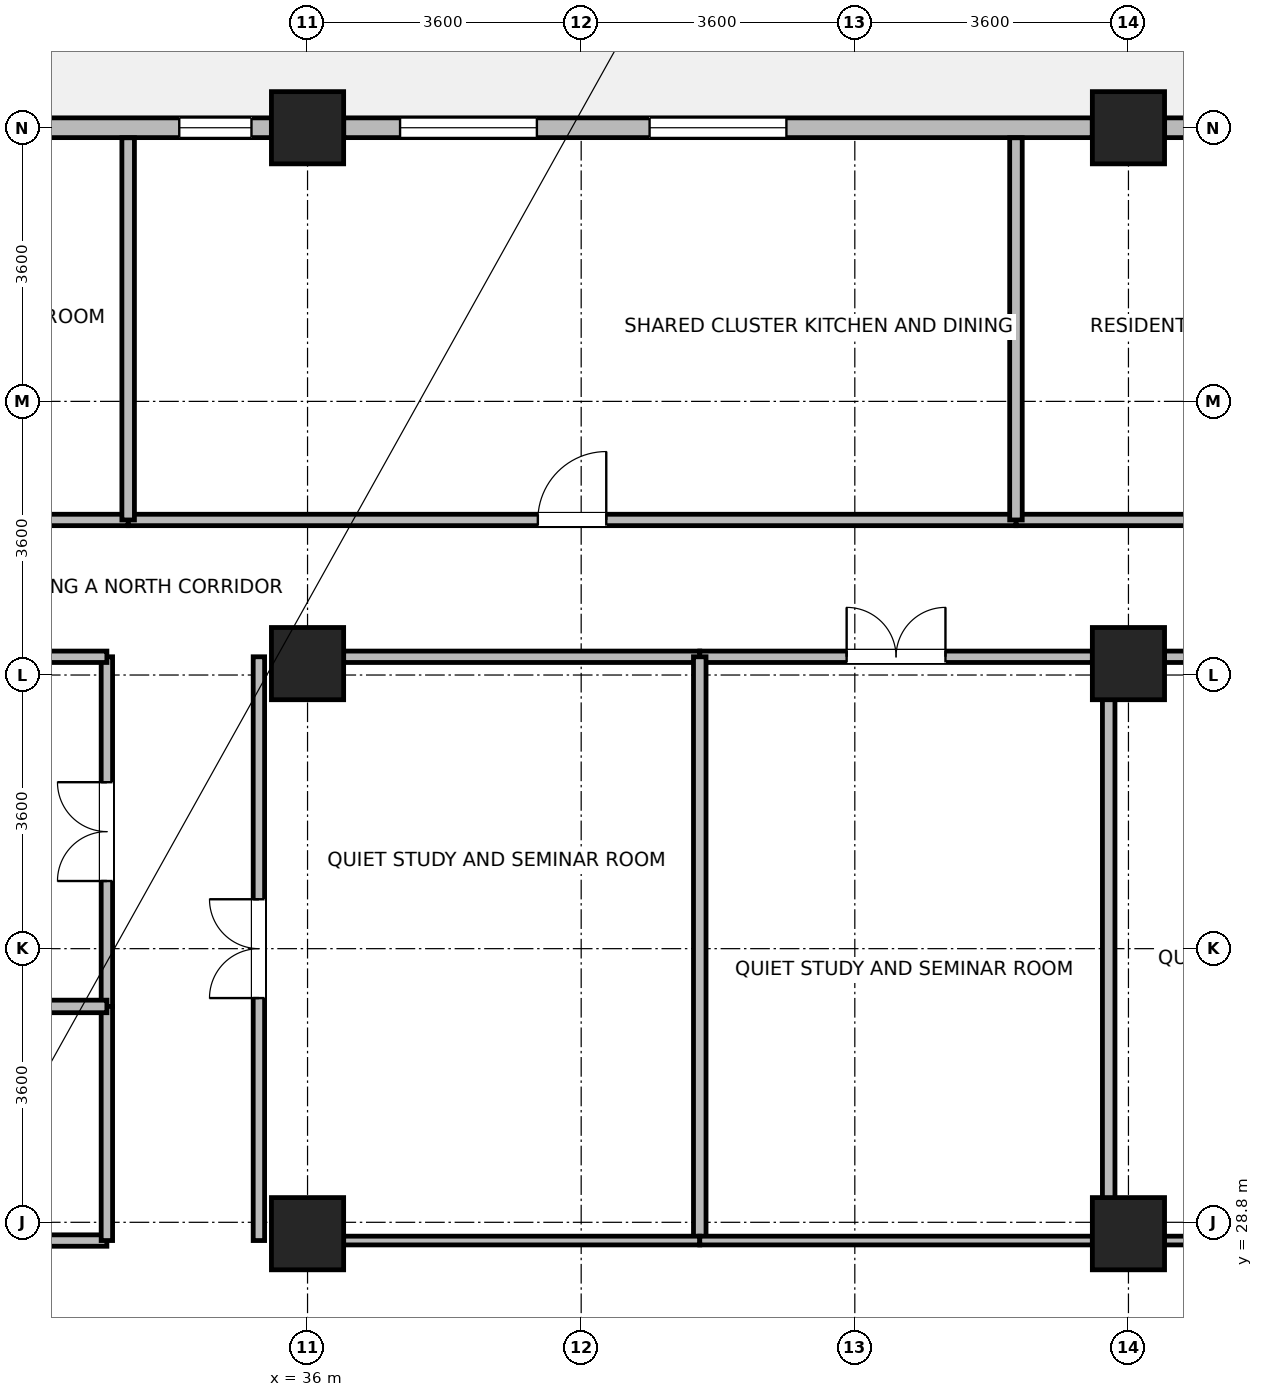
"""IFC4 building model, lengths in metres.
Left out: names, types, materials, properties, quantities, classifications, styles, units other than length and angle.
Written with IfcOpenShell. Run it as: python <this file> out.ifc"""

import sys

from ifc_helpers import new_model, si_unit, direction, frame, frame_2d, origin, origin_2d, place, context, subcontext, project, spatial, rectangle, extrude, source, transform, mapped, element, fill, save


model = new_model("IFC4")
c1 = context("Model", 3, precision=1e-05, world=origin(), true_north=direction((0.0, 1.0)))
c2 = subcontext(c1, "Body", "Model", "MODEL_VIEW")
j1 = project(units=[si_unit("LENGTHUNIT", "METRE"), si_unit("PLANEANGLEUNIT", "RADIAN")], contexts=[c1])
p1 = place(None, origin())
s1 = spatial("IfcSite", under=j1, at=p1, CompositionType="ELEMENT")
p2 = place(p1, origin())
s2 = spatial("IfcBuilding", under=s1, at=p2, CompositionType="ELEMENT")
p3 = place(p2, frame((0.0, 0.0, 212.9)))
s3 = spatial("IfcBuildingStorey", under=s2, at=p3, CompositionType="ELEMENT", Elevation=212.9)
m1 = source(origin(), c2, "Body", "SweptSolid", [
    extrude(rectangle(XDim=0.95, YDim=0.95, at=origin_2d()), origin(), (0.0, 0.0, 1.0), 3.7),
])
for number, where, z_axis, x_axis in (
    (1, (36.0, 43.2, 0.0), (0.0, 0.0, 1.0), (1.0, 0.0, 0.0)),
    (2, (36.0, 28.65, 0.0), (0.0, 0.0, 1.0), (1.0, 0.0, 0.0)),
    (3, (36.0, 36.15, 0.0), (0.0, 0.0, 1.0), (1.0, 0.0, 0.0)),
    (4, (46.8, 28.65, 0.0), (0.0, 0.0, 1.0), (1.0, 0.0, 0.0)),
    (5, (46.8, 36.15, 0.0), (0.0, 0.0, 1.0), (1.0, 0.0, 0.0)),
    (6, (46.8, 43.2, 0.0), (0.0, 0.0, 1.0), (1.0, 0.0, 0.0)),
):
    element("IfcColumn", number, at=place(p3, frame(where, z_axis=z_axis, x_axis=x_axis)), inside=s3, PredefinedType="COLUMN", context=c2, shape_type="MappedRepresentation", body=[
        mapped(m1, transform((0.0, 0.0, 0.0), x_axis=(1.0, 0.0, 0.0), y_axis=(0.0, 1.0, 0.0), z_axis=(0.0, 0.0, 1.0), scale=1.0)),
    ])
p4 = place(p3, frame((47.276, 43.2, 0.0), z_axis=(0.0, 0.0, 1.0), x_axis=(1.0, 0.0, 0.0)))
e7 = element("IfcWall", 7, at=p4, inside=s3, PredefinedType="STANDARD", context=c2, shape_type="SweptSolid", body=[
    extrude(rectangle(XDim=13.289, YDim=0.26, at=frame_2d((6.645, 0.0))), origin(), (0.0, 0.0, 1.0), 3.45),
])
p5 = place(p4, frame((5.894, 0.0, 0.0)))
e8 = element("IfcOpeningElement", 8, at=p5, cuts=e7, PredefinedType="OPENING", context=c2, shape_type="SweptSolid", body=[
    extrude(rectangle(XDim=1.5, YDim=2.15, at=frame_2d((0.75, 1.075))), frame((0.0, 0.14, 0.0), z_axis=(0.0, -1.0, 0.0), x_axis=(1.0, 0.0, 0.0)), (0.0, 0.0, 1.0), 0.28),
])
p6 = place(p4, frame((0.761, 0.0, 0.85)))
e9 = element("IfcOpeningElement", 9, at=p6, cuts=e7, PredefinedType="OPENING", context=c2, shape_type="SweptSolid", body=[
    extrude(rectangle(XDim=1.8, YDim=1.85, at=frame_2d((0.9, 0.925))), frame((0.0, 0.14, 0.0), z_axis=(0.0, -1.0, 0.0), x_axis=(1.0, 0.0, 0.0)), (0.0, 0.0, 1.0), 0.28),
])
p7 = place(p3, frame((36.476, 43.2, 0.0), z_axis=(0.0, 0.0, 1.0), x_axis=(1.0, 0.0, 0.0)))
e10 = element("IfcWall", 10, at=p7, inside=s3, PredefinedType="STANDARD", context=c2, shape_type="SweptSolid", body=[
    extrude(rectangle(XDim=9.848, YDim=0.26, at=frame_2d((4.924, 0.0))), origin(), (0.0, 0.0, 1.0), 3.05),
])
p8 = place(p7, frame((0.741, 0.0, 0.85)))
e11 = element("IfcOpeningElement", 11, at=p8, cuts=e10, PredefinedType="OPENING", context=c2, shape_type="SweptSolid", body=[
    extrude(rectangle(XDim=1.8, YDim=1.85, at=frame_2d((0.9, 0.925))), frame((0.0, 0.14, 0.0), z_axis=(0.0, -1.0, 0.0), x_axis=(1.0, 0.0, 0.0)), (0.0, 0.0, 1.0), 0.28),
])
p9 = place(p7, frame((4.024, 0.0, 0.85)))
e12 = element("IfcOpeningElement", 12, at=p9, cuts=e10, PredefinedType="OPENING", context=c2, shape_type="SweptSolid", body=[
    extrude(rectangle(XDim=1.8, YDim=1.85, at=frame_2d((0.9, 0.925))), frame((0.0, 0.14, 0.0), z_axis=(0.0, -1.0, 0.0), x_axis=(1.0, 0.0, 0.0)), (0.0, 0.0, 1.0), 0.28),
])
p10 = place(p3, frame((32.601, 43.2, 0.0), z_axis=(0.0, 0.0, 1.0), x_axis=(1.0, 0.0, 0.0)))
e13 = element("IfcWall", 13, at=p10, inside=s3, PredefinedType="STANDARD", context=c2, shape_type="SweptSolid", body=[
    extrude(rectangle(XDim=2.923, YDim=0.26, at=frame_2d((1.462, 0.0))), origin(), (0.0, 0.0, 1.0), 3.05),
])
p11 = place(p10, frame((1.712, 0.0, 0.85)))
e14 = element("IfcOpeningElement", 14, at=p11, cuts=e13, PredefinedType="OPENING", context=c2, shape_type="SweptSolid", body=[
    extrude(rectangle(XDim=0.95, YDim=1.75, at=frame_2d((0.475, 0.875))), frame((0.0, 0.14, 0.0), z_axis=(0.0, -1.0, 0.0), x_axis=(1.0, 0.0, 0.0)), (0.0, 0.0, 1.0), 0.28),
])
p12 = place(p3, frame((45.32, 38.04, 0.0), z_axis=(0.0, 0.0, 1.0), x_axis=(1.0, 0.0, 0.0)))
e15 = element("IfcWall", 15, at=p12, inside=s3, PredefinedType="PARTITIONING", context=c2, shape_type="SweptSolid", body=[
    extrude(rectangle(XDim=13.52, YDim=0.15, at=frame_2d((6.76, 0.0))), origin(), (0.0, 0.0, 1.0), 3.45),
])
p13 = place(p12, frame((6.11, 0.0, 0.0)))
e16 = element("IfcOpeningElement", 16, at=p13, cuts=e15, PredefinedType="OPENING", context=c2, shape_type="SweptSolid", body=[
    extrude(rectangle(XDim=1.3, YDim=2.12, at=frame_2d((0.65, 1.06))), frame((0.0, 0.085, 0.0), z_axis=(0.0, -1.0, 0.0), x_axis=(1.0, 0.0, 0.0)), (0.0, 0.0, 1.0), 0.17),
])
p14 = place(p3, frame((33.64, 38.04, 0.0), z_axis=(0.0, 0.0, 1.0), x_axis=(1.0, 0.0, 0.0)))
e17 = element("IfcWall", 17, at=p14, inside=s3, PredefinedType="PARTITIONING", context=c2, shape_type="SweptSolid", body=[
    extrude(rectangle(XDim=11.68, YDim=0.15, at=frame_2d((5.84, 0.0))), origin(), (0.0, 0.0, 1.0), 3.45),
])
p15 = place(p14, frame((5.39, 0.0, 0.0)))
e18 = element("IfcOpeningElement", 18, at=p15, cuts=e17, PredefinedType="OPENING", context=c2, shape_type="SweptSolid", body=[
    extrude(rectangle(XDim=0.9, YDim=2.08, at=frame_2d((0.45, 1.04))), frame((0.0, 0.085, 0.0), z_axis=(0.0, -1.0, 0.0), x_axis=(1.0, 0.0, 0.0)), (0.0, 0.0, 1.0), 0.17),
])
p16 = place(p3, frame((24.62, 38.04, 0.0), z_axis=(0.0, 0.0, 1.0), x_axis=(1.0, 0.0, 0.0)))
e19 = element("IfcWall", 19, at=p16, inside=s3, PredefinedType="PARTITIONING", context=c2, shape_type="SweptSolid", body=[
    extrude(rectangle(XDim=9.02, YDim=0.15, at=frame_2d((4.51, 0.0))), origin(), (0.0, 0.0, 1.0), 3.45),
])
p17 = place(p16, frame((3.86, 0.0, 0.0)))
e20 = element("IfcOpeningElement", 20, at=p17, cuts=e19, PredefinedType="OPENING", context=c2, shape_type="SweptSolid", body=[
    extrude(rectangle(XDim=1.3, YDim=2.12, at=frame_2d((0.65, 1.06))), frame((0.0, 0.085, 0.0), z_axis=(0.0, -1.0, 0.0), x_axis=(1.0, 0.0, 0.0)), (0.0, 0.0, 1.0), 0.17),
])
p18 = place(p3, frame((35.36, 28.56, 0.0), z_axis=(0.0, 0.0, 1.0), x_axis=(0.0, 1.0, 0.0)))
e21 = element("IfcWall", 21, at=p18, inside=s3, PredefinedType="PARTITIONING", context=c2, shape_type="SweptSolid", body=[
    extrude(rectangle(XDim=7.68, YDim=0.15, at=frame_2d((3.84, 0.0))), origin(), (0.0, 0.0, 1.0), 3.45),
])
p19 = place(p18, frame((3.19, 0.0, 0.0)))
e22 = element("IfcOpeningElement", 22, at=p19, cuts=e21, PredefinedType="OPENING", context=c2, shape_type="SweptSolid", body=[
    extrude(rectangle(XDim=1.3, YDim=2.12, at=frame_2d((0.65, 1.06))), frame((0.0, 0.085, 0.0), z_axis=(0.0, -1.0, 0.0), x_axis=(1.0, 0.0, 0.0)), (0.0, 0.0, 1.0), 0.17),
])
p20 = place(p3, frame((36.475, 36.24, 0.0), z_axis=(0.0, 0.0, 1.0), x_axis=(1.0, 0.0, 0.0)))
e23 = element("IfcWall", 23, at=p20, inside=s3, PredefinedType="PARTITIONING", context=c2, shape_type="SweptSolid", body=[
    extrude(rectangle(XDim=4.685, YDim=0.15, at=frame_2d((2.342, 0.0))), origin(), (0.0, 0.0, 1.0), 2.9),
])
p21 = place(p3, frame((41.16, 36.24, 0.0), z_axis=(0.0, 0.0, 1.0), x_axis=(1.0, 0.0, 0.0)))
e24 = element("IfcWall", 24, at=p21, inside=s3, PredefinedType="PARTITIONING", context=c2, shape_type="SweptSolid", body=[
    extrude(rectangle(XDim=5.165, YDim=0.15, at=frame_2d((2.583, 0.0))), origin(), (0.0, 0.0, 1.0), 2.9),
])
p22 = place(p21, frame((1.933, 0.0, 0.0)))
e25 = element("IfcOpeningElement", 25, at=p22, cuts=e24, PredefinedType="OPENING", context=c2, shape_type="SweptSolid", body=[
    extrude(rectangle(XDim=1.3, YDim=2.12, at=frame_2d((0.65, 1.06))), frame((0.0, 0.085, 0.0), z_axis=(0.0, -1.0, 0.0), x_axis=(1.0, 0.0, 0.0)), (0.0, 0.0, 1.0), 0.17),
])
p23 = place(p3, frame((47.275, 36.24, 0.0), z_axis=(0.0, 0.0, 1.0), x_axis=(1.0, 0.0, 0.0)))
e26 = element("IfcWall", 26, at=p23, inside=s3, PredefinedType="PARTITIONING", context=c2, shape_type="SweptSolid", body=[
    extrude(rectangle(XDim=2.65, YDim=0.15, at=frame_2d((1.325, 0.0))), origin(), (0.0, 0.0, 1.0), 2.9),
])
p24 = place(p23, frame((0.675, 0.0, 0.0)))
e27 = element("IfcOpeningElement", 27, at=p24, cuts=e26, PredefinedType="OPENING", context=c2, shape_type="SweptSolid", body=[
    extrude(rectangle(XDim=1.3, YDim=2.12, at=frame_2d((0.65, 1.06))), frame((0.0, 0.085, 0.0), z_axis=(0.0, -1.0, 0.0), x_axis=(1.0, 0.0, 0.0)), (0.0, 0.0, 1.0), 0.17),
])
p25 = place(p3, frame((33.36, 31.64, 0.0), z_axis=(0.0, 0.0, 1.0), x_axis=(0.0, 1.0, 0.0)))
e28 = element("IfcWall", 28, at=p25, inside=s3, PredefinedType="PARTITIONING", context=c2, shape_type="SweptSolid", body=[
    extrude(rectangle(XDim=4.6, YDim=0.15, at=frame_2d((2.3, 0.0))), origin(), (0.0, 0.0, 1.0), 3.45),
])
p26 = place(p25, frame((1.65, 0.0, 0.0)))
e29 = element("IfcOpeningElement", 29, at=p26, cuts=e28, PredefinedType="OPENING", context=c2, shape_type="SweptSolid", body=[
    extrude(rectangle(XDim=1.3, YDim=2.12, at=frame_2d((0.65, 1.06))), frame((0.0, 0.085, 0.0), z_axis=(0.0, -1.0, 0.0), x_axis=(1.0, 0.0, 0.0)), (0.0, 0.0, 1.0), 0.17),
])
p27 = place(p3, frame((29.275, 28.56, 0.0), z_axis=(0.0, 0.0, 1.0), x_axis=(1.0, 0.0, 0.0)))
e30 = element("IfcWall", 30, at=p27, inside=s3, PredefinedType="PARTITIONING", context=c2, shape_type="SweptSolid", body=[
    extrude(rectangle(XDim=4.085, YDim=0.15, at=frame_2d((2.042, 0.0))), origin(), (0.0, 0.0, 1.0), 2.9),
])
p28 = place(p27, frame((1.613, 0.0, 0.0)))
e31 = element("IfcOpeningElement", 31, at=p28, cuts=e30, PredefinedType="OPENING", context=c2, shape_type="SweptSolid", body=[
    extrude(rectangle(XDim=0.86, YDim=2.02, at=frame_2d((0.43, 1.01))), frame((0.0, 0.085, 0.0), z_axis=(0.0, -1.0, 0.0), x_axis=(1.0, 0.0, 0.0)), (0.0, 0.0, 1.0), 0.17),
])
p29 = place(p3, frame((29.275, 36.24, 0.0), z_axis=(0.0, 0.0, 1.0), x_axis=(1.0, 0.0, 0.0)))
e32 = element("IfcWall", 32, at=p29, inside=s3, PredefinedType="PARTITIONING", context=c2, shape_type="SweptSolid", body=[
    extrude(rectangle(XDim=4.085, YDim=0.15, at=frame_2d((2.042, 0.0))), origin(), (0.0, 0.0, 1.0), 2.9),
])
p30 = place(p3, frame((33.36, 28.56, 0.0), z_axis=(0.0, 0.0, 1.0), x_axis=(0.0, 1.0, 0.0)))
e33 = element("IfcWall", 33, at=p30, inside=s3, PredefinedType="PARTITIONING", context=c2, shape_type="SweptSolid", body=[
    extrude(rectangle(XDim=3.08, YDim=0.15, at=frame_2d((1.54, 0.0))), origin(), (0.0, 0.0, 1.0), 3.45),
])
for number, where, z_axis, x_axis in (
    (34, (41.16, 28.56, 0.0), (0.0, 0.0, 1.0), (0.0, 1.0, 0.0)),
    (35, (46.54, 28.56, 0.0), (0.0, 0.0, 1.0), (0.0, 1.0, 0.0)),
):
    element("IfcWall", number, at=place(p3, frame(where, z_axis=z_axis, x_axis=x_axis)), inside=s3, PredefinedType="PARTITIONING", context=c2, shape_type="SweptSolid", body=[
        extrude(rectangle(XDim=7.68, YDim=0.165, at=frame_2d((3.84, 0.0))), origin(), (0.0, 0.0, 1.0), 3.45),
    ])
p31 = place(p3, frame((36.475, 28.56, 0.0), z_axis=(0.0, 0.0, 1.0), x_axis=(1.0, 0.0, 0.0)))
e36 = element("IfcWall", 36, at=p31, inside=s3, PredefinedType="PARTITIONING", context=c2, shape_type="SweptSolid", body=[
    extrude(rectangle(XDim=4.685, YDim=0.115, at=frame_2d((2.342, 0.0))), origin(), (0.0, 0.0, 1.0), 2.9),
])
p32 = place(p3, frame((41.16, 28.56, 0.0), z_axis=(0.0, 0.0, 1.0), x_axis=(1.0, 0.0, 0.0)))
e37 = element("IfcWall", 37, at=p32, inside=s3, PredefinedType="PARTITIONING", context=c2, shape_type="SweptSolid", body=[
    extrude(rectangle(XDim=5.165, YDim=0.115, at=frame_2d((2.583, 0.0))), origin(), (0.0, 0.0, 1.0), 2.9),
])
for number, where, z_axis, x_axis in (
    (38, (33.64, 38.04, 0.0), (0.0, 0.0, 1.0), (0.0, 1.0, 0.0)),
    (39, (45.32, 38.04, 0.0), (0.0, 0.0, 1.0), (0.0, 1.0, 0.0)),
):
    element("IfcWall", number, at=place(p3, frame(where, z_axis=z_axis, x_axis=x_axis)), inside=s3, PredefinedType="PARTITIONING", context=c2, shape_type="SweptSolid", body=[
        extrude(rectangle(XDim=5.028, YDim=0.165, at=frame_2d((2.514, 0.0))), origin(), (0.0, 0.0, 1.0), 3.45),
    ])
p33 = place(p3, frame((47.275, 28.56, 0.0), z_axis=(0.0, 0.0, 1.0), x_axis=(1.0, 0.0, 0.0)))
e40 = element("IfcWall", 40, at=p33, inside=s3, PredefinedType="PARTITIONING", context=c2, shape_type="SweptSolid", body=[
    extrude(rectangle(XDim=2.65, YDim=0.115, at=frame_2d((1.325, 0.0))), origin(), (0.0, 0.0, 1.0), 2.9),
])
p34 = place(p3, frame((28.84, 31.64, 0.0), z_axis=(0.0, 0.0, 1.0), x_axis=(1.0, 0.0, 0.0)))
e41 = element("IfcWall", 41, at=p34, inside=s3, PredefinedType="PARTITIONING", context=c2, shape_type="SweptSolid", body=[
    extrude(rectangle(XDim=4.52, YDim=0.165, at=frame_2d((2.26, 0.0))), origin(), (0.0, 0.0, 1.0), 3.45),
])
p35 = place(p8, origin())
e42 = element("IfcWindow", 42, at=p35, inside=s3, PartitioningType="SINGLE_PANEL", PredefinedType="WINDOW", context=c2, shape_type="SweptSolid", body=[
    extrude(rectangle(XDim=1.8, YDim=1.85, at=frame_2d((0.9, 0.925))), frame((0.0, 0.03, 0.0), z_axis=(0.0, -1.0, 0.0), x_axis=(1.0, 0.0, 0.0)), (0.0, 0.0, 1.0), 0.06),
])
fill(e11, e42)
p36 = place(p9, origin())
e43 = element("IfcWindow", 43, at=p36, inside=s3, PartitioningType="SINGLE_PANEL", PredefinedType="WINDOW", context=c2, shape_type="SweptSolid", body=[
    extrude(rectangle(XDim=1.8, YDim=1.85, at=frame_2d((0.9, 0.925))), frame((0.0, 0.03, 0.0), z_axis=(0.0, -1.0, 0.0), x_axis=(1.0, 0.0, 0.0)), (0.0, 0.0, 1.0), 0.06),
])
fill(e12, e43)
p37 = place(p11, origin())
e44 = element("IfcWindow", 44, at=p37, inside=s3, PartitioningType="SINGLE_PANEL", PredefinedType="WINDOW", context=c2, shape_type="SweptSolid", body=[
    extrude(rectangle(XDim=0.95, YDim=1.75, at=frame_2d((0.475, 0.875))), frame((0.0, 0.03, 0.0), z_axis=(0.0, -1.0, 0.0), x_axis=(1.0, 0.0, 0.0)), (0.0, 0.0, 1.0), 0.06),
])
fill(e14, e44)
p38 = place(p15, origin())
e45 = element("IfcDoor", 45, at=p38, inside=s3, OperationType="SINGLE_SWING_RIGHT", PredefinedType="DOOR", context=c2, shape_type="SweptSolid", body=[
    extrude(rectangle(XDim=0.9, YDim=2.08, at=frame_2d((0.45, 1.04))), frame((0.0, 0.025, 0.0), z_axis=(0.0, -1.0, 0.0), x_axis=(1.0, 0.0, 0.0)), (0.0, 0.0, 1.0), 0.05),
])
fill(e18, e45)
p39 = place(p19, origin())
e46 = element("IfcDoor", 46, at=p39, inside=s3, OperationType="DOUBLE_DOOR_SINGLE_SWING", PredefinedType="DOOR", context=c2, shape_type="SweptSolid", body=[
    extrude(rectangle(XDim=1.3, YDim=2.12, at=frame_2d((0.65, 1.06))), frame((0.0, 0.025, 0.0), z_axis=(0.0, -1.0, 0.0), x_axis=(1.0, 0.0, 0.0)), (0.0, 0.0, 1.0), 0.05),
])
fill(e22, e46)
p40 = place(p22, origin())
e47 = element("IfcDoor", 47, at=p40, inside=s3, OperationType="DOUBLE_DOOR_SINGLE_SWING", PredefinedType="DOOR", context=c2, shape_type="SweptSolid", body=[
    extrude(rectangle(XDim=1.3, YDim=2.12, at=frame_2d((0.65, 1.06))), frame((0.0, 0.025, 0.0), z_axis=(0.0, -1.0, 0.0), x_axis=(1.0, 0.0, 0.0)), (0.0, 0.0, 1.0), 0.05),
])
fill(e25, e47)
p41 = place(p26, origin())
e48 = element("IfcDoor", 48, at=p41, inside=s3, OperationType="DOUBLE_DOOR_SINGLE_SWING", PredefinedType="DOOR", context=c2, shape_type="SweptSolid", body=[
    extrude(rectangle(XDim=1.3, YDim=2.12, at=frame_2d((0.65, 1.06))), frame((0.0, 0.025, 0.0), z_axis=(0.0, -1.0, 0.0), x_axis=(1.0, 0.0, 0.0)), (0.0, 0.0, 1.0), 0.05),
])
fill(e29, e48)
save(model, sys.argv[1])
